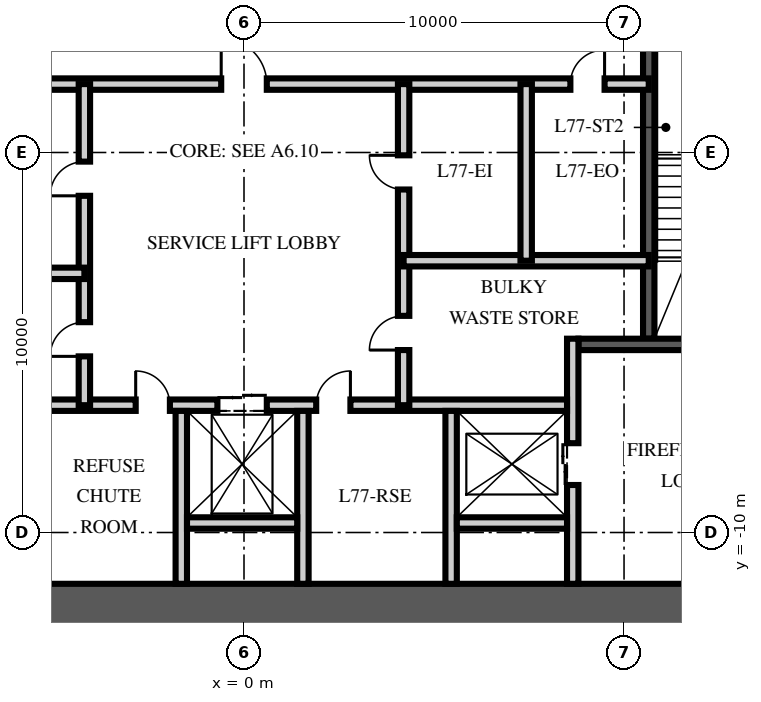
"""IFC4 building model, lengths in metres.
Left out: names, types, materials, properties, quantities, classifications, styles, units other than length and angle.
Written with IfcOpenShell. Run it as: python <this file> out.ifc"""

import sys

from ifc_helpers import new_model, si_unit, direction, frame, frame_2d, origin, place, context, subcontext, project, spatial, rectangle, extrude, element, fill, save


model = new_model("IFC4")
c1 = context("Model", 3, precision=1e-05, world=origin(), true_north=direction((0.0, 1.0)))
c2 = subcontext(c1, "Body", "Model", "MODEL_VIEW")
j1 = project(units=[si_unit("LENGTHUNIT", "METRE"), si_unit("PLANEANGLEUNIT", "RADIAN")], contexts=[c1])
p1 = place(None, origin())
s1 = spatial("IfcSite", under=j1, at=p1, CompositionType="ELEMENT")
p2 = place(p1, origin())
s2 = spatial("IfcBuilding", under=s1, at=p2, CompositionType="ELEMENT")
p3 = place(p2, frame((0.0, 0.0, 308.25)))
s3 = spatial("IfcBuildingStorey", under=s2, at=p3, CompositionType="ELEMENT", Elevation=308.25)
p4 = place(p3, frame((-15.5, -12.0, -0.25), z_axis=(0.0, 0.0, 1.0), x_axis=(1.0, 0.0, 0.0)))
e1 = element("IfcWall", 1, at=p4, inside=s3, PredefinedType="SHEAR", context=c2, shape_type="SweptSolid", body=[
    extrude(rectangle(XDim=31.0, YDim=1.3, at=frame_2d((15.5, 0.0))), origin(), (0.0, 0.0, 1.0), 3.75),
])
p5 = place(p3, frame((10.65, -4.9, 0.0), z_axis=(0.0, 0.0, 1.0), x_axis=(0.0, 1.0, 0.0)))
e2 = element("IfcWall", 2, at=p5, inside=s3, PredefinedType="SOLIDWALL", context=c2, shape_type="SweptSolid", body=[
    extrude(rectangle(XDim=10.1, YDim=0.3, at=frame_2d((5.05, 0.0))), origin(), (0.0, 0.0, 1.0), 3.5),
])
p6 = place(p3, frame((14.85, -5.05, 0.0), z_axis=(0.0, 0.0, 1.0), x_axis=(-1.0, 0.0, 0.0)))
e3 = element("IfcWall", 3, at=p6, inside=s3, PredefinedType="SOLIDWALL", context=c2, shape_type="SweptSolid", body=[
    extrude(rectangle(XDim=6.05, YDim=0.3, at=frame_2d((3.025, 0.0))), origin(), (0.0, 0.0, 1.0), 3.5),
])
p7 = place(p6, frame((1.425, 0.0, 0.0)))
e4 = element("IfcOpeningElement", 4, at=p7, cuts=e3, PredefinedType="OPENING", context=c2, shape_type="SweptSolid", body=[
    extrude(rectangle(XDim=1.2, YDim=2.1, at=frame_2d((0.6, 1.05))), frame((0.0, 0.16, 0.0), z_axis=(0.0, -1.0, 0.0), x_axis=(1.0, 0.0, 0.0)), (0.0, 0.0, 1.0), 0.32),
])
p8 = place(p3, frame((8.65, -11.35, 0.0), z_axis=(0.0, 0.0, 1.0), x_axis=(0.0, 1.0, 0.0)))
e5 = element("IfcWall", 5, at=p8, inside=s3, PredefinedType="PARTITIONING", context=c2, shape_type="SweptSolid", body=[
    extrude(rectangle(XDim=6.45, YDim=0.3, at=frame_2d((3.225, 0.0))), origin(), (0.0, 0.0, 1.0), 3.5),
])
p9 = place(p8, frame((2.6, 0.0, 0.0)))
e6 = element("IfcOpeningElement", 6, at=p9, cuts=e5, PredefinedType="OPENING", context=c2, shape_type="SweptSolid", body=[
    extrude(rectangle(XDim=1.1, YDim=2.1, at=frame_2d((0.55, 1.05))), frame((0.0, 0.16, 0.0), z_axis=(0.0, -1.0, 0.0), x_axis=(1.0, 0.0, 0.0)), (0.0, 0.0, 1.0), 0.32),
])
p10 = place(p3, frame((-8.5, -6.65, 0.0), z_axis=(0.0, 0.0, 1.0), x_axis=(1.0, 0.0, 0.0)))
e7 = element("IfcWall", 7, at=p10, inside=s3, PredefinedType="PARTITIONING", context=c2, shape_type="SweptSolid", body=[
    extrude(rectangle(XDim=17.0, YDim=0.3, at=frame_2d((8.5, 0.0))), origin(), (0.0, 0.0, 1.0), 3.5),
])
p11 = place(p10, frame((7.8, 0.0, 0.0)))
e8 = element("IfcOpeningElement", 8, at=p11, cuts=e7, PredefinedType="OPENING", context=c2, shape_type="SweptSolid", body=[
    extrude(rectangle(XDim=1.3, YDim=2.4, at=frame_2d((0.65, 1.2))), frame((0.0, 0.16, 0.0), z_axis=(0.0, -1.0, 0.0), x_axis=(1.0, 0.0, 0.0)), (0.0, 0.0, 1.0), 0.32),
])
p12 = place(p10, frame((5.65, 0.0, 0.0)))
e9 = element("IfcOpeningElement", 9, at=p12, cuts=e7, PredefinedType="OPENING", context=c2, shape_type="SweptSolid", body=[
    extrude(rectangle(XDim=0.9, YDim=2.1, at=frame_2d((0.45, 1.05))), frame((0.0, 0.16, 0.0), z_axis=(0.0, -1.0, 0.0), x_axis=(1.0, 0.0, 0.0)), (0.0, 0.0, 1.0), 0.32),
])
p13 = place(p10, frame((10.4, 0.0, 0.0)))
e10 = element("IfcOpeningElement", 10, at=p13, cuts=e7, PredefinedType="OPENING", context=c2, shape_type="SweptSolid", body=[
    extrude(rectangle(XDim=0.9, YDim=2.1, at=frame_2d((0.45, 1.05))), frame((0.0, 0.16, 0.0), z_axis=(0.0, -1.0, 0.0), x_axis=(1.0, 0.0, 0.0)), (0.0, 0.0, 1.0), 0.32),
])
for number, where, z_axis, x_axis in (
    (11, (-1.65, -11.35, 0.0), (0.0, 0.0, 1.0), (0.0, 1.0, 0.0)),
    (12, (1.55, -11.35, 0.0), (0.0, 0.0, 1.0), (0.0, 1.0, 0.0)),
    (13, (5.45, -11.35, 0.0), (0.0, 0.0, 1.0), (0.0, 1.0, 0.0)),
):
    element("IfcWall", number, at=place(p3, frame(where, z_axis=z_axis, x_axis=x_axis)), inside=s3, PredefinedType="PARTITIONING", context=c2, shape_type="SweptSolid", body=[
        extrude(rectangle(XDim=4.55, YDim=0.3, at=frame_2d((2.275, 0.0))), origin(), (0.0, 0.0, 1.0), 3.5),
    ])
for number, where, z_axis, x_axis in (
    (14, (-1.5, -9.75, 0.0), (0.0, 0.0, 1.0), (1.0, 0.0, 0.0)),
    (15, (5.6, -9.75, 0.0), (0.0, 0.0, 1.0), (1.0, 0.0, 0.0)),
):
    element("IfcWall", number, at=place(p3, frame(where, z_axis=z_axis, x_axis=x_axis)), inside=s3, PredefinedType="PARTITIONING", context=c2, shape_type="SweptSolid", body=[
        extrude(rectangle(XDim=2.9, YDim=0.3, at=frame_2d((1.45, 0.0))), origin(), (0.0, 0.0, 1.0), 3.5),
    ])
p14 = place(p3, frame((-10.65, 1.8, 0.0), z_axis=(0.0, 0.0, 1.0), x_axis=(1.0, 0.0, 0.0)))
e16 = element("IfcWall", 16, at=p14, inside=s3, PredefinedType="PARTITIONING", context=c2, shape_type="SweptSolid", body=[
    extrude(rectangle(XDim=21.3, YDim=0.3, at=frame_2d((10.65, 0.0))), origin(), (0.0, 0.0, 1.0), 3.5),
])
p15 = place(p14, frame((10.05, 0.0, 0.0)))
e17 = element("IfcOpeningElement", 17, at=p15, cuts=e16, PredefinedType="OPENING", context=c2, shape_type="SweptSolid", body=[
    extrude(rectangle(XDim=1.2, YDim=2.1, at=frame_2d((0.6, 1.05))), frame((0.0, 0.16, 0.0), z_axis=(0.0, -1.0, 0.0), x_axis=(1.0, 0.0, 0.0)), (0.0, 0.0, 1.0), 0.32),
])
p16 = place(p14, frame((19.238, 0.0, 0.0)))
e18 = element("IfcOpeningElement", 18, at=p16, cuts=e16, PredefinedType="OPENING", context=c2, shape_type="SweptSolid", body=[
    extrude(rectangle(XDim=0.9, YDim=2.1, at=frame_2d((0.45, 1.05))), frame((0.0, 0.16, 0.0), z_axis=(0.0, -1.0, 0.0), x_axis=(1.0, 0.0, 0.0)), (0.0, 0.0, 1.0), 0.32),
])
p17 = place(p3, frame((-4.2, -6.65, 0.0), z_axis=(0.0, 0.0, 1.0), x_axis=(0.0, 1.0, 0.0)))
e19 = element("IfcWall", 19, at=p17, inside=s3, PredefinedType="PARTITIONING", context=c2, shape_type="SweptSolid", body=[
    extrude(rectangle(XDim=8.45, YDim=0.3, at=frame_2d((4.225, 0.0))), origin(), (0.0, 0.0, 1.0), 3.5),
])
p18 = place(p17, frame((1.285, 0.0, 0.0)))
e20 = element("IfcOpeningElement", 20, at=p18, cuts=e19, PredefinedType="OPENING", context=c2, shape_type="SweptSolid", body=[
    extrude(rectangle(XDim=0.9, YDim=2.1, at=frame_2d((0.45, 1.05))), frame((0.0, 0.16, 0.0), z_axis=(0.0, -1.0, 0.0), x_axis=(1.0, 0.0, 0.0)), (0.0, 0.0, 1.0), 0.32),
])
p19 = place(p17, frame((5.51, 0.0, 0.0)))
e21 = element("IfcOpeningElement", 21, at=p19, cuts=e19, PredefinedType="OPENING", context=c2, shape_type="SweptSolid", body=[
    extrude(rectangle(XDim=0.9, YDim=2.1, at=frame_2d((0.45, 1.05))), frame((0.0, 0.16, 0.0), z_axis=(0.0, -1.0, 0.0), x_axis=(1.0, 0.0, 0.0)), (0.0, 0.0, 1.0), 0.32),
])
p20 = place(p3, frame((4.2, -6.65, 0.0), z_axis=(0.0, 0.0, 1.0), x_axis=(0.0, 1.0, 0.0)))
e22 = element("IfcWall", 22, at=p20, inside=s3, PredefinedType="PARTITIONING", context=c2, shape_type="SweptSolid", body=[
    extrude(rectangle(XDim=8.45, YDim=0.3, at=frame_2d((4.225, 0.0))), origin(), (0.0, 0.0, 1.0), 3.5),
])
p21 = place(p20, frame((1.451, 0.0, 0.0)))
e23 = element("IfcOpeningElement", 23, at=p21, cuts=e22, PredefinedType="OPENING", context=c2, shape_type="SweptSolid", body=[
    extrude(rectangle(XDim=0.9, YDim=2.1, at=frame_2d((0.45, 1.05))), frame((0.0, 0.16, 0.0), z_axis=(0.0, -1.0, 0.0), x_axis=(1.0, 0.0, 0.0)), (0.0, 0.0, 1.0), 0.32),
])
p22 = place(p20, frame((5.676, 0.0, 0.0)))
e24 = element("IfcOpeningElement", 24, at=p22, cuts=e22, PredefinedType="OPENING", context=c2, shape_type="SweptSolid", body=[
    extrude(rectangle(XDim=0.9, YDim=2.1, at=frame_2d((0.45, 1.05))), frame((0.0, 0.16, 0.0), z_axis=(0.0, -1.0, 0.0), x_axis=(1.0, 0.0, 0.0)), (0.0, 0.0, 1.0), 0.32),
])
for number, where, z_axis, x_axis in (
    (25, (-10.65, -3.18, 0.0), (0.0, 0.0, 1.0), (1.0, 0.0, 0.0)),
    (26, (10.65, -2.848, 0.0), (0.0, 0.0, 1.0), (-1.0, 0.0, 0.0)),
):
    element("IfcWall", number, at=place(p3, frame(where, z_axis=z_axis, x_axis=x_axis)), inside=s3, PredefinedType="PARTITIONING", context=c2, shape_type="SweptSolid", body=[
        extrude(rectangle(XDim=6.45, YDim=0.3, at=frame_2d((3.225, 0.0))), origin(), (0.0, 0.0, 1.0), 3.5),
    ])
p23 = place(p3, frame((7.425, -2.848, 0.0), z_axis=(0.0, 0.0, 1.0), x_axis=(0.0, 1.0, 0.0)))
e27 = element("IfcWall", 27, at=p23, inside=s3, PredefinedType="PARTITIONING", context=c2, shape_type="SweptSolid", body=[
    extrude(rectangle(XDim=4.648, YDim=0.3, at=frame_2d((2.324, 0.0))), origin(), (0.0, 0.0, 1.0), 3.5),
])
p24 = place(p9, origin())
e28 = element("IfcDoor", 28, at=p24, inside=s3, OperationType="DOUBLE_DOOR_SLIDING", PredefinedType="DOOR", context=c2, shape_type="SweptSolid", body=[
    extrude(rectangle(XDim=1.1, YDim=2.1, at=frame_2d((0.55, 1.05))), frame((0.0, 0.025, 0.0), z_axis=(0.0, -1.0, 0.0), x_axis=(1.0, 0.0, 0.0)), (0.0, 0.0, 1.0), 0.05),
])
fill(e6, e28)
p25 = place(p11, origin())
e29 = element("IfcDoor", 29, at=p25, inside=s3, OperationType="DOUBLE_DOOR_SLIDING", PredefinedType="DOOR", context=c2, shape_type="SweptSolid", body=[
    extrude(rectangle(XDim=1.3, YDim=2.4, at=frame_2d((0.65, 1.2))), frame((0.0, 0.025, 0.0), z_axis=(0.0, -1.0, 0.0), x_axis=(1.0, 0.0, 0.0)), (0.0, 0.0, 1.0), 0.05),
])
fill(e8, e29)
p26 = place(p15, origin())
e30 = element("IfcDoor", 30, at=p26, inside=s3, OperationType="SINGLE_SWING_LEFT", PredefinedType="DOOR", context=c2, shape_type="SweptSolid", body=[
    extrude(rectangle(XDim=1.2, YDim=2.1, at=frame_2d((0.6, 1.05))), frame((0.0, 0.025, 0.0), z_axis=(0.0, -1.0, 0.0), x_axis=(1.0, 0.0, 0.0)), (0.0, 0.0, 1.0), 0.05),
])
fill(e17, e30)
p27 = place(p12, origin())
e31 = element("IfcDoor", 31, at=p27, inside=s3, OperationType="SINGLE_SWING_LEFT", PredefinedType="DOOR", context=c2, shape_type="SweptSolid", body=[
    extrude(rectangle(XDim=0.9, YDim=2.1, at=frame_2d((0.45, 1.05))), frame((0.0, 0.025, 0.0), z_axis=(0.0, -1.0, 0.0), x_axis=(1.0, 0.0, 0.0)), (0.0, 0.0, 1.0), 0.05),
])
fill(e9, e31)
p28 = place(p13, origin())
e32 = element("IfcDoor", 32, at=p28, inside=s3, OperationType="SINGLE_SWING_RIGHT", PredefinedType="DOOR", context=c2, shape_type="SweptSolid", body=[
    extrude(rectangle(XDim=0.9, YDim=2.1, at=frame_2d((0.45, 1.05))), frame((0.0, 0.025, 0.0), z_axis=(0.0, -1.0, 0.0), x_axis=(1.0, 0.0, 0.0)), (0.0, 0.0, 1.0), 0.05),
])
fill(e10, e32)
p29 = place(p18, origin())
e33 = element("IfcDoor", 33, at=p29, inside=s3, OperationType="SINGLE_SWING_LEFT", PredefinedType="DOOR", context=c2, shape_type="SweptSolid", body=[
    extrude(rectangle(XDim=0.9, YDim=2.1, at=frame_2d((0.45, 1.05))), frame((0.0, 0.025, 0.0), z_axis=(0.0, -1.0, 0.0), x_axis=(1.0, 0.0, 0.0)), (0.0, 0.0, 1.0), 0.05),
])
fill(e20, e33)
p30 = place(p19, origin())
e34 = element("IfcDoor", 34, at=p30, inside=s3, OperationType="SINGLE_SWING_LEFT", PredefinedType="DOOR", context=c2, shape_type="SweptSolid", body=[
    extrude(rectangle(XDim=0.9, YDim=2.1, at=frame_2d((0.45, 1.05))), frame((0.0, 0.025, 0.0), z_axis=(0.0, -1.0, 0.0), x_axis=(1.0, 0.0, 0.0)), (0.0, 0.0, 1.0), 0.05),
])
fill(e21, e34)
p31 = place(p21, origin())
e35 = element("IfcDoor", 35, at=p31, inside=s3, OperationType="SINGLE_SWING_LEFT", PredefinedType="DOOR", context=c2, shape_type="SweptSolid", body=[
    extrude(rectangle(XDim=0.9, YDim=2.1, at=frame_2d((0.45, 1.05))), frame((0.0, 0.025, 0.0), z_axis=(0.0, -1.0, 0.0), x_axis=(1.0, 0.0, 0.0)), (0.0, 0.0, 1.0), 0.05),
])
fill(e23, e35)
p32 = place(p22, origin())
e36 = element("IfcDoor", 36, at=p32, inside=s3, OperationType="SINGLE_SWING_RIGHT", PredefinedType="DOOR", context=c2, shape_type="SweptSolid", body=[
    extrude(rectangle(XDim=0.9, YDim=2.1, at=frame_2d((0.45, 1.05))), frame((0.0, 0.025, 0.0), z_axis=(0.0, -1.0, 0.0), x_axis=(1.0, 0.0, 0.0)), (0.0, 0.0, 1.0), 0.05),
])
fill(e24, e36)
p33 = place(p16, origin())
e37 = element("IfcDoor", 37, at=p33, inside=s3, OperationType="SINGLE_SWING_RIGHT", PredefinedType="DOOR", context=c2, shape_type="SweptSolid", body=[
    extrude(rectangle(XDim=0.9, YDim=2.1, at=frame_2d((0.45, 1.05))), frame((0.0, 0.025, 0.0), z_axis=(0.0, -1.0, 0.0), x_axis=(1.0, 0.0, 0.0)), (0.0, 0.0, 1.0), 0.05),
])
fill(e18, e37)
save(model, sys.argv[1])
